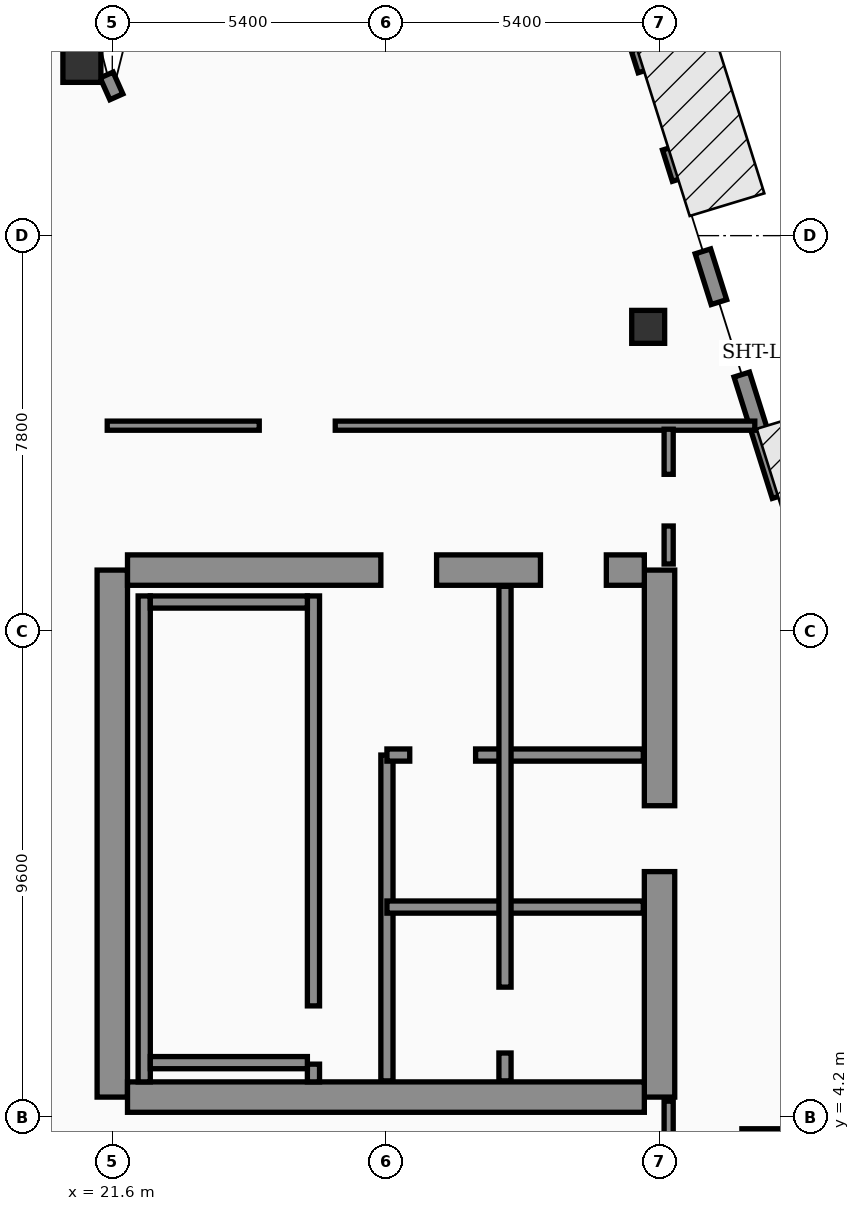
"""IFC4 building model, lengths in metres.
Left out: names, types, materials, properties, quantities, classifications, styles, units other than length and angle.
Written with IfcOpenShell. Run it as: python <this file> out.ifc"""

import sys

from ifc_helpers import new_model, si_unit, direction, frame, frame_2d, origin, origin_2d, place, context, subcontext, project, spatial, rectangle, hollow_rectangle, extrude, element, fill, save


model = new_model("IFC4")
c1 = context("Model", 3, precision=1e-05, world=origin(), true_north=direction((0.0, 1.0)))
c2 = subcontext(c1, "Body", "Model", "MODEL_VIEW")
j1 = project(units=[si_unit("LENGTHUNIT", "METRE"), si_unit("PLANEANGLEUNIT", "RADIAN")], contexts=[c1])
p1 = place(None, origin())
s1 = spatial("IfcSite", under=j1, at=p1, CompositionType="ELEMENT")
p2 = place(p1, origin())
s2 = spatial("IfcBuilding", under=s1, at=p2, CompositionType="ELEMENT")
p3 = place(p2, frame((0.0, 0.0, 311.5)))
s3 = spatial("IfcBuildingStorey", under=s2, at=p3, CompositionType="ELEMENT", Elevation=311.5)
p4 = place(p3, frame((21.6, 4.6, 0.0), z_axis=(0.0, 0.0, 1.0), x_axis=(0.0, 1.0, 0.0)))
e1 = element("IfcWall", 1, at=p4, inside=s3, PredefinedType="SHEAR", context=c2, shape_type="SweptSolid", body=[
    extrude(rectangle(XDim=10.4, YDim=0.6, at=frame_2d((5.2, 0.0))), origin(), (0.0, 0.0, 1.0), 4.26),
])
p5 = place(p3, frame((32.4, 4.6, 0.0), z_axis=(0.0, 0.0, 1.0), x_axis=(0.0, 1.0, 0.0)))
e2 = element("IfcWall", 2, at=p5, inside=s3, PredefinedType="SHEAR", context=c2, shape_type="SweptSolid", body=[
    extrude(rectangle(XDim=10.4, YDim=0.6, at=frame_2d((5.2, 0.0))), origin(), (0.0, 0.0, 1.0), 4.26),
])
p6 = place(p5, frame((4.45, 0.0, 0.0)))
e3 = element("IfcOpeningElement", 3, at=p6, cuts=e2, PredefinedType="OPENING", context=c2, shape_type="SweptSolid", body=[
    extrude(rectangle(XDim=1.3, YDim=2.35, at=frame_2d((0.65, 1.175))), frame((0.0, 0.31, 0.0), z_axis=(0.0, -1.0, 0.0), x_axis=(1.0, 0.0, 0.0)), (0.0, 0.0, 1.0), 0.62),
])
p7 = place(p3, frame((21.9, 15.0, 0.0), z_axis=(0.0, 0.0, 1.0), x_axis=(1.0, 0.0, 0.0)))
e4 = element("IfcWall", 4, at=p7, inside=s3, PredefinedType="SHEAR", context=c2, shape_type="SweptSolid", body=[
    extrude(rectangle(XDim=10.2, YDim=0.6, at=frame_2d((5.1, 0.0))), origin(), (0.0, 0.0, 1.0), 4.26),
])
p8 = place(p7, frame((5.0, 0.0, 0.0)))
e5 = element("IfcOpeningElement", 5, at=p8, cuts=e4, PredefinedType="OPENING", context=c2, shape_type="SweptSolid", body=[
    extrude(rectangle(XDim=1.1, YDim=2.2, at=frame_2d((0.55, 1.1))), frame((0.0, 0.31, 0.0), z_axis=(0.0, -1.0, 0.0), x_axis=(1.0, 0.0, 0.0)), (0.0, 0.0, 1.0), 0.62),
])
p9 = place(p7, frame((8.15, 0.0, 0.0)))
e6 = element("IfcOpeningElement", 6, at=p9, cuts=e4, PredefinedType="OPENING", context=c2, shape_type="SweptSolid", body=[
    extrude(rectangle(XDim=1.3, YDim=2.35, at=frame_2d((0.65, 1.175))), frame((0.0, 0.31, 0.0), z_axis=(0.0, -1.0, 0.0), x_axis=(1.0, 0.0, 0.0)), (0.0, 0.0, 1.0), 0.62),
])
p10 = place(p3, frame((21.9, 4.6, 0.0), z_axis=(0.0, 0.0, 1.0), x_axis=(1.0, 0.0, 0.0)))
e7 = element("IfcWall", 7, at=p10, inside=s3, PredefinedType="SHEAR", context=c2, shape_type="SweptSolid", body=[
    extrude(rectangle(XDim=10.2, YDim=0.6, at=frame_2d((5.1, 0.0))), origin(), (0.0, 0.0, 1.0), 4.26),
])
p11 = place(p3, frame((22.23, 4.9, 0.0), z_axis=(0.0, 0.0, 1.0), x_axis=(0.0, 1.0, 0.0)))
e8 = element("IfcWall", 8, at=p11, inside=s3, PredefinedType="SOLIDWALL", context=c2, shape_type="SweptSolid", body=[
    extrude(rectangle(XDim=9.59, YDim=0.24, at=frame_2d((4.795, 0.0))), origin(), (0.0, 0.0, 1.0), 4.26),
])
p12 = place(p3, frame((25.57, 4.9, 0.0), z_axis=(0.0, 0.0, 1.0), x_axis=(0.0, 1.0, 0.0)))
e9 = element("IfcWall", 9, at=p12, inside=s3, PredefinedType="SOLIDWALL", context=c2, shape_type="SweptSolid", body=[
    extrude(rectangle(XDim=9.59, YDim=0.24, at=frame_2d((4.795, 0.0))), origin(), (0.0, 0.0, 1.0), 4.26),
])
p13 = place(p12, frame((0.35, 0.0, 0.0)))
e10 = element("IfcOpeningElement", 10, at=p13, cuts=e9, PredefinedType="OPENING", context=c2, shape_type="SweptSolid", body=[
    extrude(rectangle(XDim=1.15, YDim=2.2, at=frame_2d((0.575, 1.1))), frame((0.0, 0.13, 0.0), z_axis=(0.0, -1.0, 0.0), x_axis=(1.0, 0.0, 0.0)), (0.0, 0.0, 1.0), 0.26),
])
for number, where, z_axis, x_axis in (
    (11, (22.35, 5.28, 0.0), (0.0, 0.0, 1.0), (1.0, 0.0, 0.0)),
    (12, (22.35, 14.37, 0.0), (0.0, 0.0, 1.0), (1.0, 0.0, 0.0)),
):
    element("IfcWall", number, at=place(p3, frame(where, z_axis=z_axis, x_axis=x_axis)), inside=s3, PredefinedType="SOLIDWALL", context=c2, shape_type="SweptSolid", body=[
        extrude(rectangle(XDim=3.1, YDim=0.24, at=frame_2d((1.55, 0.0))), origin(), (0.0, 0.0, 1.0), 4.26),
    ])
for number, where, z_axis, x_axis in (
    (13, (21.0, 25.0, 0.0), (0.0, 0.0, 1.0), (1.0, 0.0, 0.0)),
    (14, (34.4, 3.6, 0.0), (0.0, 0.0, 1.0), (1.0, 0.0, 0.0)),
):
    element("IfcColumn", number, at=place(p3, frame(where, z_axis=z_axis, x_axis=x_axis)), inside=s3, PredefinedType="COLUMN", context=c2, shape_type="SweptSolid", body=[
        extrude(hollow_rectangle(XDim=0.75, YDim=0.75, WallThickness=0.032, at=origin_2d()), origin(), (0.0, 0.0, 1.0), 4.26),
    ])
p14 = place(p3, frame((32.176, 19.8, 0.0), z_axis=(0.0, 0.0, 1.0), x_axis=(1.0, 0.0, 0.0)))
e15 = element("IfcColumn", 15, at=p14, inside=s3, PredefinedType="COLUMN", context=c2, shape_type="SweptSolid", body=[
    extrude(hollow_rectangle(XDim=0.65, YDim=0.65, WallThickness=0.028, at=origin_2d()), origin(), (0.0, 0.0, 1.0), 4.26),
])
p15 = place(p3, frame((21.68, 24.34, 0.0), z_axis=(0.0, 0.0, 1.0), x_axis=(-0.40758134973, 0.913168901875, 0.0)))
e16 = element("IfcWall", 16, at=p15, inside=s3, PredefinedType="SOLIDWALL", context=c2, shape_type="SweptSolid", body=[
    extrude(rectangle(XDim=0.471, YDim=0.28, at=frame_2d((0.235, 0.0))), origin(), (0.0, 0.0, 1.0), 4.26),
])
p16 = place(p3, frame((38.23, 5.505, 0.0), z_axis=(0.0, 0.0, 1.0), x_axis=(-0.300509063924, 0.953778958931, 0.0)))
e17 = element("IfcWall", 17, at=p16, inside=s3, PredefinedType="SOLIDWALL", context=c2, shape_type="SweptSolid", body=[
    extrude(rectangle(XDim=30.814, YDim=0.32, at=frame_2d((15.407, 0.0))), origin(), (0.0, 0.0, 1.0), 4.26),
])
p17 = place(p16, frame((4.437, 0.0, 0.7)))
e18 = element("IfcOpeningElement", 18, at=p17, cuts=e17, PredefinedType="OPENING", context=c2, shape_type="SweptSolid", body=[
    extrude(rectangle(XDim=1.6, YDim=1.65, at=frame_2d((0.8, 0.825))), frame((0.0, 0.17, 0.0), z_axis=(0.0, -1.0, 0.0), x_axis=(1.0, 0.0, 0.0)), (0.0, 0.0, 1.0), 0.34),
])
p18 = place(p16, frame((9.889, 0.0, 0.7)))
e19 = element("IfcOpeningElement", 19, at=p18, cuts=e17, PredefinedType="OPENING", context=c2, shape_type="SweptSolid", body=[
    extrude(rectangle(XDim=1.6, YDim=1.65, at=frame_2d((0.8, 0.825))), frame((0.0, 0.17, 0.0), z_axis=(0.0, -1.0, 0.0), x_axis=(1.0, 0.0, 0.0)), (0.0, 0.0, 1.0), 0.34),
])
p19 = place(p16, frame((18.696, 0.0, 0.7)))
e20 = element("IfcOpeningElement", 20, at=p19, cuts=e17, PredefinedType="OPENING", context=c2, shape_type="SweptSolid", body=[
    extrude(rectangle(XDim=1.6, YDim=1.65, at=frame_2d((0.8, 0.825))), frame((0.0, 0.17, 0.0), z_axis=(0.0, -1.0, 0.0), x_axis=(1.0, 0.0, 0.0)), (0.0, 0.0, 1.0), 0.34),
])
p20 = place(p16, frame((1.6, 0.0, 0.75)))
e21 = element("IfcOpeningElement", 21, at=p20, cuts=e17, PredefinedType="OPENING", context=c2, shape_type="SweptSolid", body=[
    extrude(rectangle(XDim=1.5, YDim=1.6, at=frame_2d((0.75, 0.8))), frame((0.0, 0.17, 0.0), z_axis=(0.0, -1.0, 0.0), x_axis=(1.0, 0.0, 0.0)), (0.0, 0.0, 1.0), 0.34),
])
p21 = place(p16, frame((7.8, 0.0, 0.75)))
e22 = element("IfcOpeningElement", 22, at=p21, cuts=e17, PredefinedType="OPENING", context=c2, shape_type="SweptSolid", body=[
    extrude(rectangle(XDim=1.5, YDim=1.6, at=frame_2d((0.75, 0.8))), frame((0.0, 0.17, 0.0), z_axis=(0.0, -1.0, 0.0), x_axis=(1.0, 0.0, 0.0)), (0.0, 0.0, 1.0), 0.34),
])
p22 = place(p16, frame((14.0, 0.0, 0.75)))
e23 = element("IfcOpeningElement", 23, at=p22, cuts=e17, PredefinedType="OPENING", context=c2, shape_type="SweptSolid", body=[
    extrude(rectangle(XDim=1.5, YDim=1.6, at=frame_2d((0.75, 0.8))), frame((0.0, 0.17, 0.0), z_axis=(0.0, -1.0, 0.0), x_axis=(1.0, 0.0, 0.0)), (0.0, 0.0, 1.0), 0.34),
])
p23 = place(p16, frame((16.55, 0.0, 0.75)))
e24 = element("IfcOpeningElement", 24, at=p23, cuts=e17, PredefinedType="OPENING", context=c2, shape_type="SweptSolid", body=[
    extrude(rectangle(XDim=1.5, YDim=1.6, at=frame_2d((0.75, 0.8))), frame((0.0, 0.17, 0.0), z_axis=(0.0, -1.0, 0.0), x_axis=(1.0, 0.0, 0.0)), (0.0, 0.0, 1.0), 0.34),
])
p24 = place(p16, frame((20.75, 0.0, 0.75)))
e25 = element("IfcOpeningElement", 25, at=p24, cuts=e17, PredefinedType="OPENING", context=c2, shape_type="SweptSolid", body=[
    extrude(rectangle(XDim=1.5, YDim=1.6, at=frame_2d((0.75, 0.8))), frame((0.0, 0.17, 0.0), z_axis=(0.0, -1.0, 0.0), x_axis=(1.0, 0.0, 0.0)), (0.0, 0.0, 1.0), 0.34),
])
p25 = place(p16, frame((23.3, 0.0, 0.75)))
e26 = element("IfcOpeningElement", 26, at=p25, cuts=e17, PredefinedType="OPENING", context=c2, shape_type="SweptSolid", body=[
    extrude(rectangle(XDim=1.5, YDim=1.6, at=frame_2d((0.75, 0.8))), frame((0.0, 0.17, 0.0), z_axis=(0.0, -1.0, 0.0), x_axis=(1.0, 0.0, 0.0)), (0.0, 0.0, 1.0), 0.34),
])
p26 = place(p16, frame((26.4, 0.0, 0.75)))
e27 = element("IfcOpeningElement", 27, at=p26, cuts=e17, PredefinedType="OPENING", context=c2, shape_type="SweptSolid", body=[
    extrude(rectangle(XDim=1.5, YDim=1.6, at=frame_2d((0.75, 0.8))), frame((0.0, 0.17, 0.0), z_axis=(0.0, -1.0, 0.0), x_axis=(1.0, 0.0, 0.0)), (0.0, 0.0, 1.0), 0.34),
])
p27 = place(p3, frame((27.02, 4.92, 0.0), z_axis=(0.0, 0.0, 1.0), x_axis=(0.0, 1.0, 0.0)))
e28 = element("IfcWall", 28, at=p27, inside=s3, PredefinedType="SOLIDWALL", context=c2, shape_type="SweptSolid", body=[
    extrude(rectangle(XDim=6.43, YDim=0.24, at=frame_2d((3.215, 0.0))), origin(), (0.0, 0.0, 1.0), 4.26),
])
p28 = place(p3, frame((27.02, 11.35, 0.0), z_axis=(0.0, 0.0, 1.0), x_axis=(1.0, 0.0, 0.0)))
e29 = element("IfcWall", 29, at=p28, inside=s3, PredefinedType="SOLIDWALL", context=c2, shape_type="SweptSolid", body=[
    extrude(rectangle(XDim=5.06, YDim=0.24, at=frame_2d((2.53, 0.0))), origin(), (0.0, 0.0, 1.0), 4.26),
])
p29 = place(p28, frame((0.45, 0.0, 0.0)))
e30 = element("IfcOpeningElement", 30, at=p29, cuts=e29, PredefinedType="OPENING", context=c2, shape_type="SweptSolid", body=[
    extrude(rectangle(XDim=1.3, YDim=2.35, at=frame_2d((0.65, 1.175))), frame((0.0, 0.13, 0.0), z_axis=(0.0, -1.0, 0.0), x_axis=(1.0, 0.0, 0.0)), (0.0, 0.0, 1.0), 0.26),
])
p30 = place(p3, frame((27.02, 8.35, 0.0), z_axis=(0.0, 0.0, 1.0), x_axis=(1.0, 0.0, 0.0)))
e31 = element("IfcWall", 31, at=p30, inside=s3, PredefinedType="SOLIDWALL", context=c2, shape_type="SweptSolid", body=[
    extrude(rectangle(XDim=5.06, YDim=0.24, at=frame_2d((2.53, 0.0))), origin(), (0.0, 0.0, 1.0), 4.26),
])
p31 = place(p3, frame((29.35, 4.92, 0.0), z_axis=(0.0, 0.0, 1.0), x_axis=(0.0, 1.0, 0.0)))
e32 = element("IfcWall", 32, at=p31, inside=s3, PredefinedType="SOLIDWALL", context=c2, shape_type="SweptSolid", body=[
    extrude(rectangle(XDim=9.76, YDim=0.24, at=frame_2d((4.88, 0.0))), origin(), (0.0, 0.0, 1.0), 4.26),
])
p32 = place(p31, frame((0.55, 0.0, 0.0)))
e33 = element("IfcOpeningElement", 33, at=p32, cuts=e32, PredefinedType="OPENING", context=c2, shape_type="SweptSolid", body=[
    extrude(rectangle(XDim=1.3, YDim=2.35, at=frame_2d((0.65, 1.175))), frame((0.0, 0.13, 0.0), z_axis=(0.0, -1.0, 0.0), x_axis=(1.0, 0.0, 0.0)), (0.0, 0.0, 1.0), 0.26),
])
p33 = place(p3, frame((21.5, 17.85, 0.0), z_axis=(0.0, 0.0, 1.0), x_axis=(1.0, 0.0, 0.0)))
e34 = element("IfcWall", 34, at=p33, inside=s3, PredefinedType="PARTITIONING", context=c2, shape_type="SweptSolid", body=[
    extrude(rectangle(XDim=12.78, YDim=0.18, at=frame_2d((6.39, 0.0))), origin(), (0.0, 0.0, 1.0), 3.69),
])
p34 = place(p33, frame((3.0, 0.0, 0.0)))
e35 = element("IfcOpeningElement", 35, at=p34, cuts=e34, PredefinedType="OPENING", context=c2, shape_type="SweptSolid", body=[
    extrude(rectangle(XDim=1.5, YDim=2.22, at=frame_2d((0.75, 1.11))), frame((0.0, 0.1, 0.0), z_axis=(0.0, -1.0, 0.0), x_axis=(1.0, 0.0, 0.0)), (0.0, 0.0, 1.0), 0.2),
])
p35 = place(p3, frame((32.58, 15.12, 0.0), z_axis=(0.0, 0.0, 1.0), x_axis=(0.0, 1.0, 0.0)))
e36 = element("IfcWall", 36, at=p35, inside=s3, PredefinedType="PARTITIONING", context=c2, shape_type="SweptSolid", body=[
    extrude(rectangle(XDim=2.66, YDim=0.18, at=frame_2d((1.33, 0.0))), origin(), (0.0, 0.0, 1.0), 3.69),
])
p36 = place(p35, frame((0.75, 0.0, 0.0)))
e37 = element("IfcOpeningElement", 37, at=p36, cuts=e36, PredefinedType="OPENING", context=c2, shape_type="SweptSolid", body=[
    extrude(rectangle(XDim=1.02, YDim=2.2, at=frame_2d((0.51, 1.1))), frame((0.0, 0.1, 0.0), z_axis=(0.0, -1.0, 0.0), x_axis=(1.0, 0.0, 0.0)), (0.0, 0.0, 1.0), 0.2),
])
p37 = place(p3, frame((32.58, 2.6, 0.0), z_axis=(0.0, 0.0, 1.0), x_axis=(0.0, 1.0, 0.0)))
e38 = element("IfcWall", 38, at=p37, inside=s3, PredefinedType="PARTITIONING", context=c2, shape_type="SweptSolid", body=[
    extrude(rectangle(XDim=1.92, YDim=0.18, at=frame_2d((0.96, 0.0))), origin(), (0.0, 0.0, 1.0), 3.69),
])
p38 = place(p18, origin())
e39 = element("IfcWindow", 39, at=p38, inside=s3, PartitioningType="SINGLE_PANEL", PredefinedType="WINDOW", context=c2, shape_type="SweptSolid", body=[
    extrude(rectangle(XDim=1.6, YDim=1.65, at=frame_2d((0.8, 0.825))), frame((0.0, 0.03, 0.0), z_axis=(0.0, -1.0, 0.0), x_axis=(1.0, 0.0, 0.0)), (0.0, 0.0, 1.0), 0.06),
])
fill(e19, e39)
p39 = place(p19, origin())
e40 = element("IfcWindow", 40, at=p39, inside=s3, PartitioningType="SINGLE_PANEL", PredefinedType="WINDOW", context=c2, shape_type="SweptSolid", body=[
    extrude(rectangle(XDim=1.6, YDim=1.65, at=frame_2d((0.8, 0.825))), frame((0.0, 0.03, 0.0), z_axis=(0.0, -1.0, 0.0), x_axis=(1.0, 0.0, 0.0)), (0.0, 0.0, 1.0), 0.06),
])
fill(e20, e40)
p40 = place(p22, origin())
e41 = element("IfcWindow", 41, at=p40, inside=s3, PartitioningType="SINGLE_PANEL", PredefinedType="WINDOW", context=c2, shape_type="SweptSolid", body=[
    extrude(rectangle(XDim=1.5, YDim=1.6, at=frame_2d((0.75, 0.8))), frame((0.0, 0.03, 0.0), z_axis=(0.0, -1.0, 0.0), x_axis=(1.0, 0.0, 0.0)), (0.0, 0.0, 1.0), 0.06),
])
fill(e23, e41)
p41 = place(p23, origin())
e42 = element("IfcWindow", 42, at=p41, inside=s3, PartitioningType="SINGLE_PANEL", PredefinedType="WINDOW", context=c2, shape_type="SweptSolid", body=[
    extrude(rectangle(XDim=1.5, YDim=1.6, at=frame_2d((0.75, 0.8))), frame((0.0, 0.03, 0.0), z_axis=(0.0, -1.0, 0.0), x_axis=(1.0, 0.0, 0.0)), (0.0, 0.0, 1.0), 0.06),
])
fill(e24, e42)
p42 = place(p29, origin())
e43 = element("IfcDoor", 43, at=p42, inside=s3, OperationType="DOUBLE_DOOR_SLIDING", PredefinedType="DOOR", context=c2, shape_type="SweptSolid", body=[
    extrude(rectangle(XDim=1.3, YDim=2.35, at=frame_2d((0.65, 1.175))), frame((0.0, 0.025, 0.0), z_axis=(0.0, -1.0, 0.0), x_axis=(1.0, 0.0, 0.0)), (0.0, 0.0, 1.0), 0.05),
])
fill(e30, e43)
p43 = place(p32, origin())
e44 = element("IfcDoor", 44, at=p43, inside=s3, OperationType="DOUBLE_DOOR_SLIDING", PredefinedType="DOOR", context=c2, shape_type="SweptSolid", body=[
    extrude(rectangle(XDim=1.3, YDim=2.35, at=frame_2d((0.65, 1.175))), frame((0.0, 0.025, 0.0), z_axis=(0.0, -1.0, 0.0), x_axis=(1.0, 0.0, 0.0)), (0.0, 0.0, 1.0), 0.05),
])
fill(e33, e44)
p44 = place(p34, origin())
e45 = element("IfcDoor", 45, at=p44, inside=s3, OperationType="SINGLE_SWING_LEFT", PredefinedType="DOOR", context=c2, shape_type="SweptSolid", body=[
    extrude(rectangle(XDim=1.5, YDim=2.22, at=frame_2d((0.75, 1.11))), frame((0.0, 0.025, 0.0), z_axis=(0.0, -1.0, 0.0), x_axis=(1.0, 0.0, 0.0)), (0.0, 0.0, 1.0), 0.05),
])
fill(e35, e45)
p45 = place(p36, origin())
e46 = element("IfcDoor", 46, at=p45, inside=s3, OperationType="SINGLE_SWING_RIGHT", PredefinedType="DOOR", context=c2, shape_type="SweptSolid", body=[
    extrude(rectangle(XDim=1.02, YDim=2.2, at=frame_2d((0.51, 1.1))), frame((0.0, 0.025, 0.0), z_axis=(0.0, -1.0, 0.0), x_axis=(1.0, 0.0, 0.0)), (0.0, 0.0, 1.0), 0.05),
])
fill(e37, e46)
p46 = place(p13, origin())
e47 = element("IfcDoor", 47, at=p46, inside=s3, OperationType="SINGLE_SWING_RIGHT", PredefinedType="DOOR", context=c2, shape_type="SweptSolid", body=[
    extrude(rectangle(XDim=1.15, YDim=2.2, at=frame_2d((0.575, 1.1))), frame((0.0, 0.025, 0.0), z_axis=(0.0, -1.0, 0.0), x_axis=(1.0, 0.0, 0.0)), (0.0, 0.0, 1.0), 0.05),
])
fill(e10, e47)
p47 = place(p8, origin())
e48 = element("IfcDoor", 48, at=p47, inside=s3, OperationType="SINGLE_SWING_LEFT", PredefinedType="DOOR", context=c2, shape_type="SweptSolid", body=[
    extrude(rectangle(XDim=1.1, YDim=2.2, at=frame_2d((0.55, 1.1))), frame((0.0, 0.025, 0.0), z_axis=(0.0, -1.0, 0.0), x_axis=(1.0, 0.0, 0.0)), (0.0, 0.0, 1.0), 0.05),
])
fill(e5, e48)
p48 = place(p9, origin())
e49 = element("IfcDoor", 49, at=p48, inside=s3, OperationType="DOUBLE_DOOR_SLIDING", PredefinedType="DOOR", context=c2, shape_type="SweptSolid", body=[
    extrude(rectangle(XDim=1.3, YDim=2.35, at=frame_2d((0.65, 1.175))), frame((0.0, 0.025, 0.0), z_axis=(0.0, -1.0, 0.0), x_axis=(1.0, 0.0, 0.0)), (0.0, 0.0, 1.0), 0.05),
])
fill(e6, e49)
p49 = place(p6, origin())
e50 = element("IfcDoor", 50, at=p49, inside=s3, OperationType="DOUBLE_DOOR_SLIDING", PredefinedType="DOOR", context=c2, shape_type="SweptSolid", body=[
    extrude(rectangle(XDim=1.3, YDim=2.35, at=frame_2d((0.65, 1.175))), frame((0.0, 0.025, 0.0), z_axis=(0.0, -1.0, 0.0), x_axis=(1.0, 0.0, 0.0)), (0.0, 0.0, 1.0), 0.05),
])
fill(e3, e50)
save(model, sys.argv[1])
